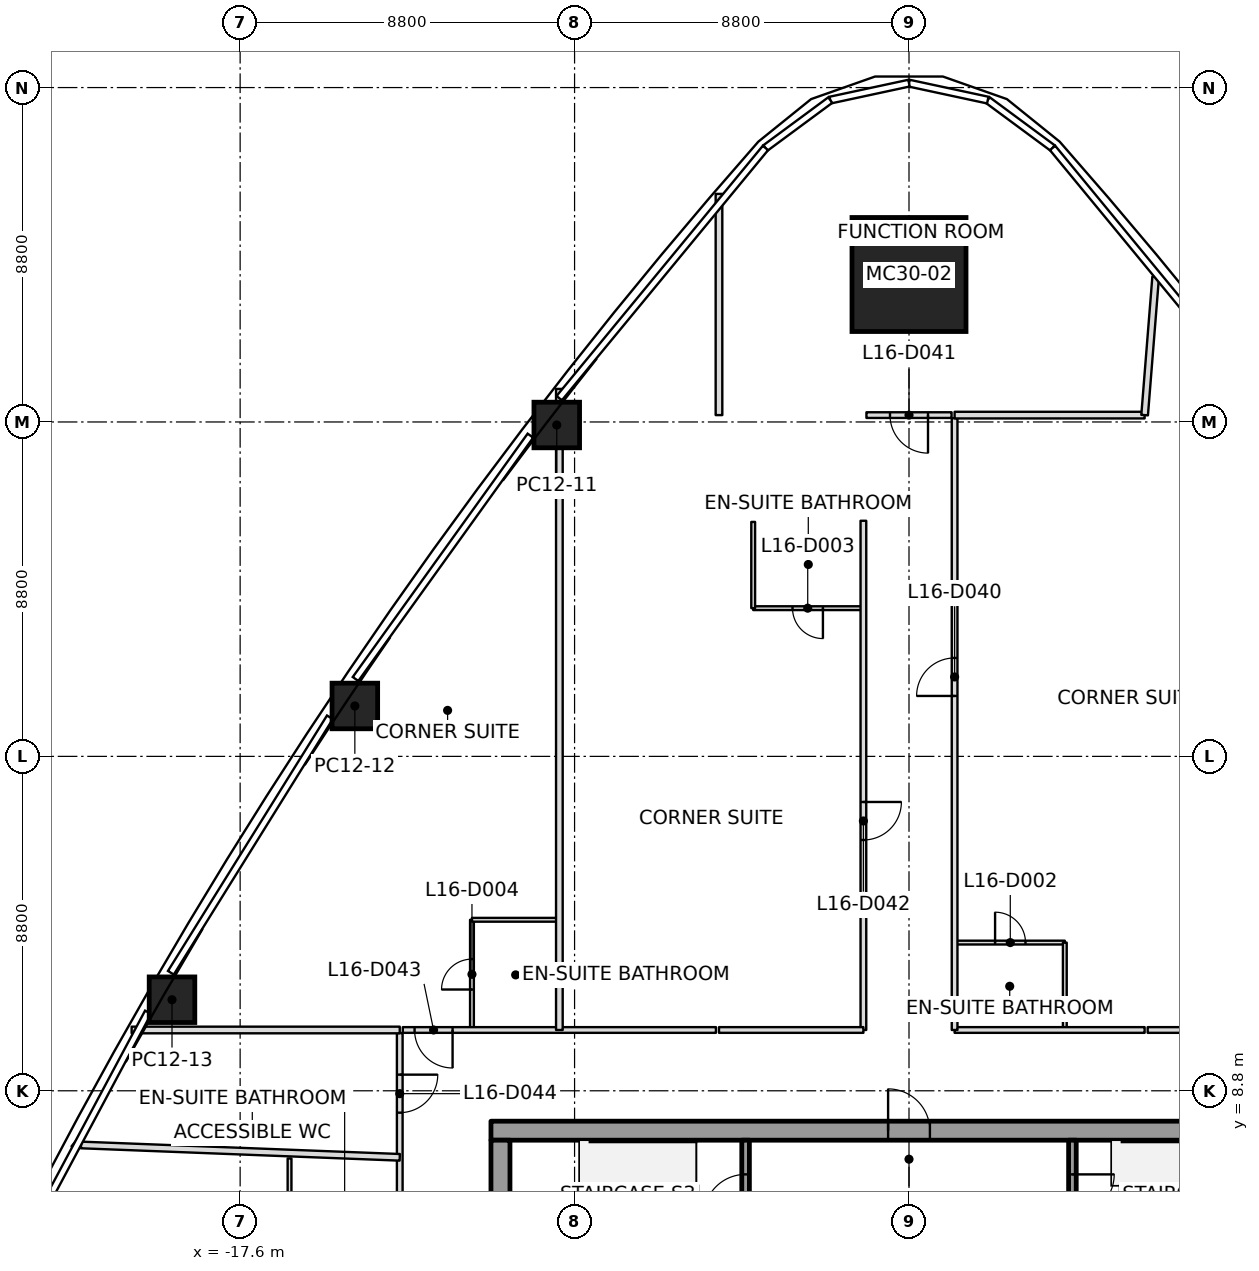
"""IFC4 building model, lengths in metres.
Left out: names, types, materials, properties, quantities, classifications, styles, units other than length and angle.
Written with IfcOpenShell. Run it as: python <this file> out.ifc"""

import sys

from ifc_helpers import new_model, si_unit, direction, frame, frame_2d, origin, origin_2d, place, context, subcontext, project, spatial, rectangle, extrude, element, fill, save


model = new_model("IFC4")
c1 = context("Model", 3, precision=1e-05, world=origin(), true_north=direction((0.0, 1.0)))
c2 = subcontext(c1, "Body", "Model", "MODEL_VIEW")
j1 = project(units=[si_unit("LENGTHUNIT", "METRE"), si_unit("PLANEANGLEUNIT", "RADIAN")], contexts=[c1])
p1 = place(None, origin())
s1 = spatial("IfcSite", under=j1, at=p1, CompositionType="ELEMENT")
p2 = place(p1, origin())
s2 = spatial("IfcBuilding", under=s1, at=p2, CompositionType="ELEMENT")
p3 = place(p2, frame((0.0, 0.0, 81.3)))
s3 = spatial("IfcBuildingStorey", under=s2, at=p3, CompositionType="ELEMENT", Elevation=81.3)
p4 = place(p3, frame((0.0, 30.281, 0.0), z_axis=(0.0, -0.035214042205, 0.999379793288), x_axis=(1.0, 0.0, 0.0)))
e1 = element("IfcColumn", 1, at=p4, inside=s3, PredefinedType="COLUMN", context=c2, shape_type="SweptSolid", body=[
    extrude(rectangle(XDim=3.0, YDim=3.0, at=origin_2d()), origin(), (0.0, 0.0, 1.0), 3.702),
])
p5 = place(p3, frame((-9.269, 26.32, 0.0), z_axis=(0.00019790496, -0.022363260521, 0.999749891429), x_axis=(0.610123026815, 0.792111234616, 0.0175978449)))
e2 = element("IfcColumn", 2, at=p5, inside=s3, PredefinedType="COLUMN", context=c2, shape_type="SweptSolid", body=[
    extrude(rectangle(XDim=1.2, YDim=1.2, at=origin_2d()), origin(), (0.0, 0.0, 1.0), 3.701),
])
p6 = place(p3, frame((-14.582, 18.926, 0.0), z_axis=(0.005674016471, -0.014382971985, 0.999880460682), x_axis=(0.556275058009, 0.830951674334, 0.008796292314)))
e3 = element("IfcColumn", 3, at=p6, inside=s3, PredefinedType="COLUMN", context=c2, shape_type="SweptSolid", body=[
    extrude(rectangle(XDim=1.2, YDim=1.2, at=origin_2d()), origin(), (0.0, 0.0, 1.0), 3.7),
])
p7 = place(p3, frame((-19.393, 11.196, 0.0), z_axis=(0.010688729499, -0.00613612249, 0.999924046647), x_axis=(0.49997143695, 0.866041893524, -2.9922579e-05)))
e4 = element("IfcColumn", 4, at=p7, inside=s3, PredefinedType="COLUMN", context=c2, shape_type="SweptSolid", body=[
    extrude(rectangle(XDim=1.2, YDim=1.2, at=origin_2d()), origin(), (0.0, 0.0, 1.0), 3.7),
])
p8 = place(p3, frame((-11.0, 7.75, 0.0), z_axis=(0.0, 0.0, 1.0), x_axis=(1.0, 0.0, 0.0)))
e5 = element("IfcWall", 5, at=p8, inside=s3, PredefinedType="SHEAR", context=c2, shape_type="SweptSolid", body=[
    extrude(rectangle(XDim=22.0, YDim=0.5, at=frame_2d((11.0, 0.0))), origin(), (0.0, 0.0, 1.0), 3.7),
])
p9 = place(p8, frame((10.45, 0.0, 0.0)))
e6 = element("IfcOpeningElement", 6, at=p9, cuts=e5, PredefinedType="OPENING", context=c2, shape_type="SweptSolid", body=[
    extrude(rectangle(XDim=1.1, YDim=2.1, at=frame_2d((0.55, 1.05))), frame((0.0, 0.25, 0.0), z_axis=(0.0, -1.0, 0.0), x_axis=(1.0, 0.0, 0.0)), (0.0, 0.0, 1.0), 0.5),
])
p10 = place(p3, frame((-10.75, -7.5, 0.0), z_axis=(0.0, 0.0, 1.0), x_axis=(0.0, 1.0, 0.0)))
e7 = element("IfcWall", 7, at=p10, inside=s3, PredefinedType="SHEAR", context=c2, shape_type="SweptSolid", body=[
    extrude(rectangle(XDim=15.0, YDim=0.5, at=frame_2d((7.5, 0.0))), origin(), (0.0, 0.0, 1.0), 3.7),
])
p11 = place(p10, frame((6.6, 0.0, 0.0)))
e8 = element("IfcOpeningElement", 8, at=p11, cuts=e7, PredefinedType="OPENING", context=c2, shape_type="SweptSolid", body=[
    extrude(rectangle(XDim=1.8, YDim=2.1, at=frame_2d((0.9, 1.05))), frame((0.0, 0.25, 0.0), z_axis=(0.0, -1.0, 0.0), x_axis=(1.0, 0.0, 0.0)), (0.0, 0.0, 1.0), 0.5),
])
p12 = place(p3, frame((-4.3, 4.6, 0.0), z_axis=(0.0, 0.0, 1.0), x_axis=(0.0, 1.0, 0.0)))
e9 = element("IfcWall", 9, at=p12, inside=s3, PredefinedType="SOLIDWALL", context=c2, shape_type="SweptSolid", body=[
    extrude(rectangle(XDim=2.9, YDim=0.2, at=frame_2d((1.45, 0.0))), origin(), (0.0, 0.0, 1.0), 3.55),
])
p13 = place(p12, frame((0.9, 0.0, 0.0)))
e10 = element("IfcOpeningElement", 10, at=p13, cuts=e9, PredefinedType="OPENING", context=c2, shape_type="SweptSolid", body=[
    extrude(rectangle(XDim=1.1, YDim=2.1, at=frame_2d((0.55, 1.05))), frame((0.0, 0.1, 0.0), z_axis=(0.0, -1.0, 0.0), x_axis=(1.0, 0.0, 0.0)), (0.0, 0.0, 1.0), 0.2),
])
p14 = place(p3, frame((4.3, 7.5, 0.0), z_axis=(0.0, 0.0, 1.0), x_axis=(0.0, -1.0, 0.0)))
e11 = element("IfcWall", 11, at=p14, inside=s3, PredefinedType="SOLIDWALL", context=c2, shape_type="SweptSolid", body=[
    extrude(rectangle(XDim=2.9, YDim=0.2, at=frame_2d((1.45, 0.0))), origin(), (0.0, 0.0, 1.0), 3.55),
])
p15 = place(p14, frame((0.9, 0.0, 0.0)))
e12 = element("IfcOpeningElement", 12, at=p15, cuts=e11, PredefinedType="OPENING", context=c2, shape_type="SweptSolid", body=[
    extrude(rectangle(XDim=1.1, YDim=2.1, at=frame_2d((0.55, 1.05))), frame((0.0, 0.1, 0.0), z_axis=(0.0, -1.0, 0.0), x_axis=(1.0, 0.0, 0.0)), (0.0, 0.0, 1.0), 0.2),
])
p16 = place(p3, frame((-21.837, 7.288, 0.0), z_axis=(0.0, 0.0, 1.0), x_axis=(-0.77226902916, 0.635295637164, 0.0)))
e13 = element("IfcWall", 13, at=p16, inside=s3, PredefinedType="PARTITIONING", context=c2, shape_type="SweptSolid", body=[
    extrude(rectangle(XDim=0.187, YDim=0.175, at=frame_2d((0.094, 0.0))), origin(), (0.0, 0.0, 1.0), 3.15),
])
p17 = place(p3, frame((-21.787, 7.375, 0.0), z_axis=(0.0, 0.0, 1.0), x_axis=(0.999247968332, -0.038774963373, 0.0)))
e14 = element("IfcWall", 14, at=p17, inside=s3, PredefinedType="PARTITIONING", context=c2, shape_type="SweptSolid", body=[
    extrude(rectangle(XDim=8.393, YDim=0.175, at=frame_2d((4.197, 0.0))), origin(), (0.0, 0.0, 1.0), 2.934),
])
p18 = place(p3, frame((-13.4, 10.4, 0.0), z_axis=(0.0, 0.0, 1.0), x_axis=(-1.0, 0.0, 0.0)))
e15 = element("IfcWall", 15, at=p18, inside=s3, PredefinedType="PARTITIONING", context=c2, shape_type="SweptSolid", body=[
    extrude(rectangle(XDim=7.055, YDim=0.175, at=frame_2d((3.527, 0.0))), origin(), (0.0, 0.0, 1.0), 2.934),
])
p19 = place(p3, frame((-9.2, 10.4, 0.0), z_axis=(0.0, 0.0, 1.0), x_axis=(0.0, 1.0, 0.0)))
e16 = element("IfcWall", 16, at=p19, inside=s3, PredefinedType="PARTITIONING", context=c2, shape_type="SweptSolid", body=[
    extrude(rectangle(XDim=16.87, YDim=0.175, at=frame_2d((8.435, 0.0))), origin(), (0.0, 0.0, 1.0), 2.947),
])
p20 = place(p3, frame((-5.0, 32.402, 0.0), z_axis=(0.0, 0.0, 1.0), x_axis=(0.0, -1.0, 0.0)))
e17 = element("IfcWall", 17, at=p20, inside=s3, PredefinedType="PARTITIONING", context=c2, shape_type="SweptSolid", body=[
    extrude(rectangle(XDim=5.821, YDim=0.175, at=frame_2d((2.911, 0.0))), origin(), (0.0, 0.0, 1.0), 2.934),
])
p21 = place(p3, frame((1.2, 26.581, 0.0), z_axis=(0.0, 0.0, 1.0), x_axis=(1.0, 0.0, 0.0)))
e18 = element("IfcWall", 18, at=p21, inside=s3, PredefinedType="PARTITIONING", context=c2, shape_type="SweptSolid", body=[
    extrude(rectangle(XDim=5.0, YDim=0.175, at=frame_2d((2.5, 0.0))), origin(), (0.0, 0.0, 1.0), 3.15),
])
p22 = place(p3, frame((6.2, 26.581, 0.0), z_axis=(0.0, 0.0, 1.0), x_axis=(0.079662809164, 0.996821868157, 0.0)))
e19 = element("IfcWall", 19, at=p22, inside=s3, PredefinedType="PARTITIONING", context=c2, shape_type="SweptSolid", body=[
    extrude(rectangle(XDim=3.65, YDim=0.175, at=frame_2d((1.825, 0.0))), origin(), (0.0, 0.0, 1.0), 2.934),
])
p23 = place(p3, frame((-13.4, 10.32, 0.0), z_axis=(0.0, 0.0, 1.0), x_axis=(0.0, -1.0, 0.0)))
e20 = element("IfcWall", 20, at=p23, inside=s3, PredefinedType="PARTITIONING", context=c2, shape_type="SweptSolid", body=[
    extrude(rectangle(XDim=16.671, YDim=0.15, at=frame_2d((8.335, 0.0))), origin(), (0.0, 0.0, 1.0), 2.947),
])
p24 = place(p23, frame((1.095, 0.0, 0.0)))
e21 = element("IfcOpeningElement", 21, at=p24, cuts=e20, PredefinedType="OPENING", context=c2, shape_type="SweptSolid", body=[
    extrude(rectangle(XDim=1.0, YDim=2.1, at=frame_2d((0.5, 1.05))), frame((0.0, 0.075, 0.0), z_axis=(0.0, -1.0, 0.0), x_axis=(1.0, 0.0, 0.0)), (0.0, 0.0, 1.0), 0.15),
])
p25 = place(p23, frame((10.671, 0.0, 0.0)))
e22 = element("IfcOpeningElement", 22, at=p25, cuts=e20, PredefinedType="OPENING", context=c2, shape_type="SweptSolid", body=[
    extrude(rectangle(XDim=1.0, YDim=2.1, at=frame_2d((0.5, 1.05))), frame((0.0, 0.075, 0.0), z_axis=(0.0, -1.0, 0.0), x_axis=(1.0, 0.0, 0.0)), (0.0, 0.0, 1.0), 0.15),
])
p26 = place(p3, frame((-5.08, 10.4, 0.0), z_axis=(0.0, 0.0, 1.0), x_axis=(-1.0, 0.0, 0.0)))
e23 = element("IfcWall", 23, at=p26, inside=s3, PredefinedType="PARTITIONING", context=c2, shape_type="SweptSolid", body=[
    extrude(rectangle(XDim=8.24, YDim=0.15, at=frame_2d((4.12, 0.0))), origin(), (0.0, 0.0, 1.0), 2.947),
])
p27 = place(p26, frame((6.93, 0.0, 0.0)))
e24 = element("IfcOpeningElement", 24, at=p27, cuts=e23, PredefinedType="OPENING", context=c2, shape_type="SweptSolid", body=[
    extrude(rectangle(XDim=1.0, YDim=2.1, at=frame_2d((0.5, 1.05))), frame((0.0, 0.075, 0.0), z_axis=(0.0, -1.0, 0.0), x_axis=(1.0, 0.0, 0.0)), (0.0, 0.0, 1.0), 0.15),
])
p28 = place(p3, frame((-1.2, 23.8, 0.0), z_axis=(0.0, 0.0, 1.0), x_axis=(0.0, -1.0, 0.0)))
e25 = element("IfcWall", 25, at=p28, inside=s3, PredefinedType="PARTITIONING", context=c2, shape_type="SweptSolid", body=[
    extrude(rectangle(XDim=13.4, YDim=0.15, at=frame_2d((6.7, 0.0))), origin(), (0.0, 0.0, 1.0), 2.947),
])
p29 = place(p28, frame((7.4, 0.0, 0.0)))
e26 = element("IfcOpeningElement", 26, at=p29, cuts=e25, PredefinedType="OPENING", context=c2, shape_type="SweptSolid", body=[
    extrude(rectangle(XDim=1.0, YDim=2.1, at=frame_2d((0.5, 1.05))), frame((0.0, 0.075, 0.0), z_axis=(0.0, -1.0, 0.0), x_axis=(1.0, 0.0, 0.0)), (0.0, 0.0, 1.0), 0.15),
])
p30 = place(p3, frame((-1.2, 10.4, 0.0), z_axis=(0.0, 0.0, 1.0), x_axis=(-1.0, 0.0, 0.0)))
e27 = element("IfcWall", 27, at=p30, inside=s3, PredefinedType="PARTITIONING", context=c2, shape_type="SweptSolid", body=[
    extrude(rectangle(XDim=3.8, YDim=0.15, at=frame_2d((1.9, 0.0))), origin(), (0.0, 0.0, 1.0), 3.15),
])
p31 = place(p3, frame((1.12, 26.581, 0.0), z_axis=(0.0, 0.0, 1.0), x_axis=(-1.0, 0.0, 0.0)))
e28 = element("IfcWall", 28, at=p31, inside=s3, PredefinedType="PARTITIONING", context=c2, shape_type="SweptSolid", body=[
    extrude(rectangle(XDim=2.24, YDim=0.15, at=frame_2d((1.12, 0.0))), origin(), (0.0, 0.0, 1.0), 2.797),
])
p32 = place(p31, frame((0.62, 0.0, 0.0)))
e29 = element("IfcOpeningElement", 29, at=p32, cuts=e28, PredefinedType="OPENING", context=c2, shape_type="SweptSolid", body=[
    extrude(rectangle(XDim=1.0, YDim=2.1, at=frame_2d((0.5, 1.05))), frame((0.0, 0.075, 0.0), z_axis=(0.0, -1.0, 0.0), x_axis=(1.0, 0.0, 0.0)), (0.0, 0.0, 1.0), 0.15),
])
p33 = place(p3, frame((6.2, 10.4, 0.0), z_axis=(0.0, 0.0, 1.0), x_axis=(-1.0, 0.0, 0.0)))
e30 = element("IfcWall", 30, at=p33, inside=s3, PredefinedType="PARTITIONING", context=c2, shape_type="SweptSolid", body=[
    extrude(rectangle(XDim=5.0, YDim=0.15, at=frame_2d((2.5, 0.0))), origin(), (0.0, 0.0, 1.0), 3.15),
])
p34 = place(p3, frame((1.2, 10.4, 0.0), z_axis=(0.0, 0.0, 1.0), x_axis=(0.0, 1.0, 0.0)))
e31 = element("IfcWall", 31, at=p34, inside=s3, PredefinedType="PARTITIONING", context=c2, shape_type="SweptSolid", body=[
    extrude(rectangle(XDim=16.101, YDim=0.15, at=frame_2d((8.05, 0.0))), origin(), (0.0, 0.0, 1.0), 2.947),
])
p35 = place(p34, frame((8.79, 0.0, 0.0)))
e32 = element("IfcOpeningElement", 32, at=p35, cuts=e31, PredefinedType="OPENING", context=c2, shape_type="SweptSolid", body=[
    extrude(rectangle(XDim=1.0, YDim=2.1, at=frame_2d((0.5, 1.05))), frame((0.0, 0.075, 0.0), z_axis=(0.0, -1.0, 0.0), x_axis=(1.0, 0.0, 0.0)), (0.0, 0.0, 1.0), 0.15),
])
p36 = place(p3, frame((13.32, 10.4, 0.0), z_axis=(0.0, 0.0, 1.0), x_axis=(-1.0, 0.0, 0.0)))
e33 = element("IfcWall", 33, at=p36, inside=s3, PredefinedType="PARTITIONING", context=c2, shape_type="SweptSolid", body=[
    extrude(rectangle(XDim=7.04, YDim=0.15, at=frame_2d((3.52, 0.0))), origin(), (0.0, 0.0, 1.0), 2.947),
])
p37 = place(p36, frame((0.91, 0.0, 0.0)))
e34 = element("IfcOpeningElement", 34, at=p37, cuts=e33, PredefinedType="OPENING", context=c2, shape_type="SweptSolid", body=[
    extrude(rectangle(XDim=1.0, YDim=2.1, at=frame_2d((0.5, 1.05))), frame((0.0, 0.075, 0.0), z_axis=(0.0, -1.0, 0.0), x_axis=(1.0, 0.0, 0.0)), (0.0, 0.0, 1.0), 0.15),
])
p38 = place(p3, frame((-16.3, 4.749, 0.0), z_axis=(0.0, 0.0, 1.0), x_axis=(0.0, 1.0, 0.0)))
e35 = element("IfcWall", 35, at=p38, inside=s3, PredefinedType="PARTITIONING", context=c2, shape_type="SweptSolid", body=[
    extrude(rectangle(XDim=2.27, YDim=0.1, at=frame_2d((1.135, 0.0))), origin(), (0.0, 0.0, 1.0), 3.15),
])
p39 = place(p3, frame((-11.5, 10.43, 0.0), z_axis=(0.0, 0.0, 1.0), x_axis=(0.0, 1.0, 0.0)))
e36 = element("IfcWall", 36, at=p39, inside=s3, PredefinedType="PARTITIONING", context=c2, shape_type="SweptSolid", body=[
    extrude(rectangle(XDim=2.87, YDim=0.1, at=frame_2d((1.435, 0.0))), origin(), (0.0, 0.0, 1.0), 2.947),
])
p40 = place(p39, frame((1.035, 0.0, 0.0)))
e37 = element("IfcOpeningElement", 37, at=p40, cuts=e36, PredefinedType="OPENING", context=c2, shape_type="SweptSolid", body=[
    extrude(rectangle(XDim=0.8, YDim=2.1, at=frame_2d((0.4, 1.05))), frame((0.0, 0.05, 0.0), z_axis=(0.0, -1.0, 0.0), x_axis=(1.0, 0.0, 0.0)), (0.0, 0.0, 1.0), 0.1),
])
p41 = place(p3, frame((-11.5, 13.3, 0.0), z_axis=(0.0, 0.0, 1.0), x_axis=(1.0, 0.0, 0.0)))
e38 = element("IfcWall", 38, at=p41, inside=s3, PredefinedType="PARTITIONING", context=c2, shape_type="SweptSolid", body=[
    extrude(rectangle(XDim=2.27, YDim=0.1, at=frame_2d((1.135, 0.0))), origin(), (0.0, 0.0, 1.0), 3.15),
])
p42 = place(p3, frame((-1.23, 21.5, 0.0), z_axis=(0.0, 0.0, 1.0), x_axis=(-1.0, 0.0, 0.0)))
e39 = element("IfcWall", 39, at=p42, inside=s3, PredefinedType="PARTITIONING", context=c2, shape_type="SweptSolid", body=[
    extrude(rectangle(XDim=2.87, YDim=0.1, at=frame_2d((1.435, 0.0))), origin(), (0.0, 0.0, 1.0), 3.15),
])
p43 = place(p42, frame((1.035, 0.0, 0.0)))
e40 = element("IfcOpeningElement", 40, at=p43, cuts=e39, PredefinedType="OPENING", context=c2, shape_type="SweptSolid", body=[
    extrude(rectangle(XDim=0.8, YDim=2.1, at=frame_2d((0.4, 1.05))), frame((0.0, 0.05, 0.0), z_axis=(0.0, -1.0, 0.0), x_axis=(1.0, 0.0, 0.0)), (0.0, 0.0, 1.0), 0.1),
])
p44 = place(p3, frame((-4.1, 21.5, 0.0), z_axis=(0.0, 0.0, 1.0), x_axis=(0.0, 1.0, 0.0)))
e41 = element("IfcWall", 41, at=p44, inside=s3, PredefinedType="PARTITIONING", context=c2, shape_type="SweptSolid", body=[
    extrude(rectangle(XDim=2.27, YDim=0.1, at=frame_2d((1.135, 0.0))), origin(), (0.0, 0.0, 1.0), 3.15),
])
p45 = place(p3, frame((1.23, 12.7, 0.0), z_axis=(0.0, 0.0, 1.0), x_axis=(1.0, 0.0, 0.0)))
e42 = element("IfcWall", 42, at=p45, inside=s3, PredefinedType="PARTITIONING", context=c2, shape_type="SweptSolid", body=[
    extrude(rectangle(XDim=2.87, YDim=0.1, at=frame_2d((1.435, 0.0))), origin(), (0.0, 0.0, 1.0), 3.15),
])
p46 = place(p45, frame((1.035, 0.0, 0.0)))
e43 = element("IfcOpeningElement", 43, at=p46, cuts=e42, PredefinedType="OPENING", context=c2, shape_type="SweptSolid", body=[
    extrude(rectangle(XDim=0.8, YDim=2.1, at=frame_2d((0.4, 1.05))), frame((0.0, 0.05, 0.0), z_axis=(0.0, -1.0, 0.0), x_axis=(1.0, 0.0, 0.0)), (0.0, 0.0, 1.0), 0.1),
])
p47 = place(p3, frame((4.1, 12.7, 0.0), z_axis=(0.0, 0.0, 1.0), x_axis=(0.0, -1.0, 0.0)))
e44 = element("IfcWall", 44, at=p47, inside=s3, PredefinedType="PARTITIONING", context=c2, shape_type="SweptSolid", body=[
    extrude(rectangle(XDim=2.27, YDim=0.1, at=frame_2d((1.135, 0.0))), origin(), (0.0, 0.0, 1.0), 3.15),
])
p48 = place(p35, origin())
e45 = element("IfcDoor", 45, at=p48, inside=s3, OperationType="SINGLE_SWING_RIGHT", PredefinedType="DOOR", context=c2, shape_type="SweptSolid", body=[
    extrude(rectangle(XDim=1.0, YDim=2.1, at=frame_2d((0.5, 1.05))), frame((0.0, 0.025, 0.0), z_axis=(0.0, -1.0, 0.0), x_axis=(1.0, 0.0, 0.0)), (0.0, 0.0, 1.0), 0.05),
])
fill(e32, e45)
p49 = place(p46, origin())
e46 = element("IfcDoor", 46, at=p49, inside=s3, OperationType="SINGLE_SWING_LEFT", PredefinedType="DOOR", context=c2, shape_type="SweptSolid", body=[
    extrude(rectangle(XDim=0.8, YDim=2.1, at=frame_2d((0.4, 1.05))), frame((0.0, 0.025, 0.0), z_axis=(0.0, -1.0, 0.0), x_axis=(1.0, 0.0, 0.0)), (0.0, 0.0, 1.0), 0.05),
])
fill(e43, e46)
p50 = place(p32, origin())
e47 = element("IfcDoor", 47, at=p50, inside=s3, OperationType="SINGLE_SWING_LEFT", PredefinedType="DOOR", context=c2, shape_type="SweptSolid", body=[
    extrude(rectangle(XDim=1.0, YDim=2.1, at=frame_2d((0.5, 1.05))), frame((0.0, 0.025, 0.0), z_axis=(0.0, -1.0, 0.0), x_axis=(1.0, 0.0, 0.0)), (0.0, 0.0, 1.0), 0.05),
])
fill(e29, e47)
p51 = place(p29, origin())
e48 = element("IfcDoor", 48, at=p51, inside=s3, OperationType="SINGLE_SWING_LEFT", PredefinedType="DOOR", context=c2, shape_type="SweptSolid", body=[
    extrude(rectangle(XDim=1.0, YDim=2.1, at=frame_2d((0.5, 1.05))), frame((0.0, 0.025, 0.0), z_axis=(0.0, -1.0, 0.0), x_axis=(1.0, 0.0, 0.0)), (0.0, 0.0, 1.0), 0.05),
])
fill(e26, e48)
p52 = place(p43, origin())
e49 = element("IfcDoor", 49, at=p52, inside=s3, OperationType="SINGLE_SWING_LEFT", PredefinedType="DOOR", context=c2, shape_type="SweptSolid", body=[
    extrude(rectangle(XDim=0.8, YDim=2.1, at=frame_2d((0.4, 1.05))), frame((0.0, 0.025, 0.0), z_axis=(0.0, -1.0, 0.0), x_axis=(1.0, 0.0, 0.0)), (0.0, 0.0, 1.0), 0.05),
])
fill(e40, e49)
p53 = place(p27, origin())
e50 = element("IfcDoor", 50, at=p53, inside=s3, OperationType="SINGLE_SWING_RIGHT", PredefinedType="DOOR", context=c2, shape_type="SweptSolid", body=[
    extrude(rectangle(XDim=1.0, YDim=2.1, at=frame_2d((0.5, 1.05))), frame((0.0, 0.025, 0.0), z_axis=(0.0, -1.0, 0.0), x_axis=(1.0, 0.0, 0.0)), (0.0, 0.0, 1.0), 0.05),
])
fill(e24, e50)
p54 = place(p40, origin())
e51 = element("IfcDoor", 51, at=p54, inside=s3, OperationType="SINGLE_SWING_RIGHT", PredefinedType="DOOR", context=c2, shape_type="SweptSolid", body=[
    extrude(rectangle(XDim=0.8, YDim=2.1, at=frame_2d((0.4, 1.05))), frame((0.0, 0.025, 0.0), z_axis=(0.0, -1.0, 0.0), x_axis=(1.0, 0.0, 0.0)), (0.0, 0.0, 1.0), 0.05),
])
fill(e37, e51)
p55 = place(p24, origin())
e52 = element("IfcDoor", 52, at=p55, inside=s3, OperationType="SINGLE_SWING_RIGHT", PredefinedType="DOOR", context=c2, shape_type="SweptSolid", body=[
    extrude(rectangle(XDim=1.0, YDim=2.1, at=frame_2d((0.5, 1.05))), frame((0.0, 0.025, 0.0), z_axis=(0.0, -1.0, 0.0), x_axis=(1.0, 0.0, 0.0)), (0.0, 0.0, 1.0), 0.05),
])
fill(e21, e52)
p56 = place(p13, origin())
e53 = element("IfcDoor", 53, at=p56, inside=s3, OperationType="SINGLE_SWING_RIGHT", PredefinedType="DOOR", context=c2, shape_type="SweptSolid", body=[
    extrude(rectangle(XDim=1.1, YDim=2.1, at=frame_2d((0.55, 1.05))), frame((0.0, 0.025, 0.0), z_axis=(0.0, -1.0, 0.0), x_axis=(1.0, 0.0, 0.0)), (0.0, 0.0, 1.0), 0.05),
])
fill(e10, e53)
p57 = place(p15, origin())
e54 = element("IfcDoor", 54, at=p57, inside=s3, OperationType="SINGLE_SWING_LEFT", PredefinedType="DOOR", context=c2, shape_type="SweptSolid", body=[
    extrude(rectangle(XDim=1.1, YDim=2.1, at=frame_2d((0.55, 1.05))), frame((0.0, 0.025, 0.0), z_axis=(0.0, -1.0, 0.0), x_axis=(1.0, 0.0, 0.0)), (0.0, 0.0, 1.0), 0.05),
])
fill(e12, e54)
p58 = place(p9, origin())
e55 = element("IfcDoor", 55, at=p58, inside=s3, OperationType="SINGLE_SWING_LEFT", PredefinedType="DOOR", context=c2, shape_type="SweptSolid", body=[
    extrude(rectangle(XDim=1.1, YDim=2.1, at=frame_2d((0.55, 1.05))), frame((0.0, 0.025, 0.0), z_axis=(0.0, -1.0, 0.0), x_axis=(1.0, 0.0, 0.0)), (0.0, 0.0, 1.0), 0.05),
])
fill(e6, e55)
save(model, sys.argv[1])
